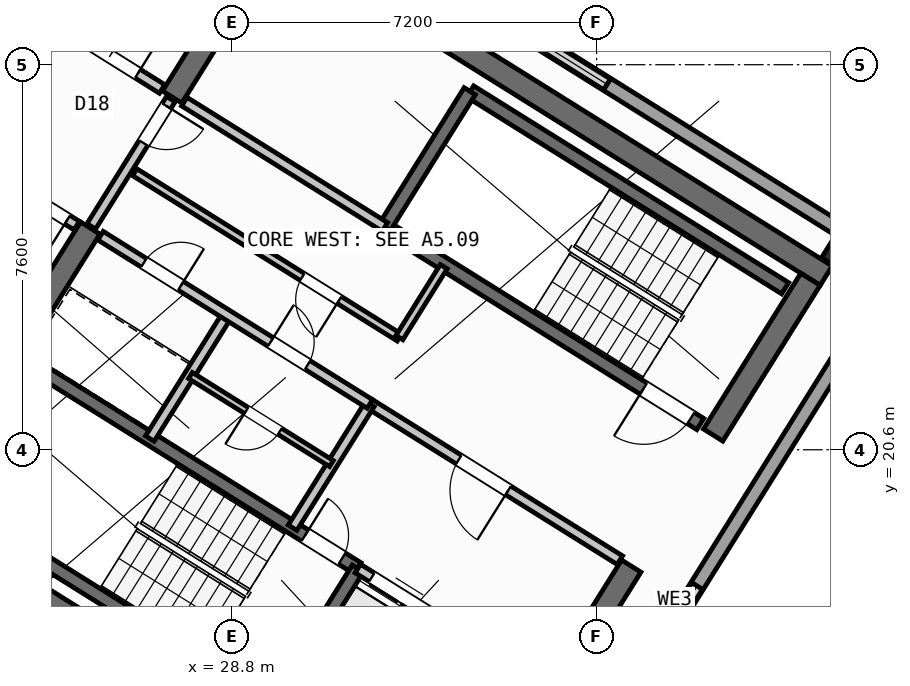
"""IFC4 building model, lengths in metres.
Left out: names, types, materials, properties, quantities, classifications, styles, units other than length and angle.
Written with IfcOpenShell. Run it as: python <this file> out.ifc"""

import sys

from ifc_helpers import new_model, si_unit, direction, frame, frame_2d, origin, origin_2d, place, context, subcontext, project, spatial, rectangle, hollow_rectangle, extrude, source, transform, mapped, element, fill, save


model = new_model("IFC4")
c1 = context("Model", 3, precision=1e-05, world=origin(), true_north=direction((0.0, 1.0)))
c2 = subcontext(c1, "Body", "Model", "MODEL_VIEW")
j1 = project(units=[si_unit("LENGTHUNIT", "METRE"), si_unit("PLANEANGLEUNIT", "RADIAN")], contexts=[c1])
p1 = place(None, origin())
s1 = spatial("IfcSite", under=j1, at=p1, CompositionType="ELEMENT")
p2 = place(p1, origin())
s2 = spatial("IfcBuilding", under=s1, at=p2, CompositionType="ELEMENT")
p3 = place(p2, frame((0.0, 0.0, 313.2)))
s3 = spatial("IfcBuildingStorey", under=s2, at=p3, CompositionType="ELEMENT", Elevation=313.2)
p4 = place(p3, frame((40.531, 24.036, 0.0), z_axis=(0.0, 0.0, 1.0), x_axis=(-0.848048787466, 0.529918157905, 0.0)))
e1 = element("IfcWall", 1, at=p4, inside=s3, PredefinedType="SHEAR", context=c2, shape_type="SweptSolid", body=[
    extrude(rectangle(XDim=13.04, YDim=0.45, at=frame_2d((6.52, 0.0))), origin(), (0.0, 0.0, 1.0), 3.32),
])
p5 = place(p3, frame((33.324, 12.503, 0.0), z_axis=(0.0, 0.0, 1.0), x_axis=(-0.848043529849, 0.529926571782, 0.0)))
e2 = element("IfcWall", 2, at=p5, inside=s3, PredefinedType="SHEAR", context=c2, shape_type="SweptSolid", body=[
    extrude(rectangle(XDim=13.04, YDim=0.45, at=frame_2d((6.52, 0.0))), origin(), (0.0, 0.0, 1.0), 3.32),
])
p6 = place(p3, frame((40.221, 23.965, 0.0), z_axis=(0.0, 0.0, 1.0), x_axis=(-0.529902075036, -0.848058836916, 0.0)))
e3 = element("IfcWall", 3, at=p6, inside=s3, PredefinedType="SHEAR", context=c2, shape_type="SweptSolid", body=[
    extrude(rectangle(XDim=3.625, YDim=0.45, at=frame_2d((1.812, 0.0))), origin(), (0.0, 0.0, 1.0), 3.32),
])
p7 = place(p3, frame((36.683, 18.304, 0.0), z_axis=(0.0, 0.0, 1.0), x_axis=(-0.529904039071, -0.848057609704, 0.0)))
e4 = element("IfcWall", 4, at=p7, inside=s3, PredefinedType="SHEAR", context=c2, shape_type="SweptSolid", body=[
    extrude(rectangle(XDim=6.475, YDim=0.45, at=frame_2d((3.238, 0.0))), origin(), (0.0, 0.0, 1.0), 3.32),
])
p8 = place(p3, frame((29.544, 30.636, 0.0), z_axis=(0.0, 0.0, 1.0), x_axis=(-0.529902075036, -0.848058836916, 0.0)))
e5 = element("IfcWall", 5, at=p8, inside=s3, PredefinedType="SHEAR", context=c2, shape_type="SweptSolid", body=[
    extrude(rectangle(XDim=3.625, YDim=0.45, at=frame_2d((1.812, 0.0))), origin(), (0.0, 0.0, 1.0), 3.32),
])
p9 = place(p3, frame((26.007, 24.976, 0.0), z_axis=(0.0, 0.0, 1.0), x_axis=(-0.529931155655, -0.848040665456, 0.0)))
e6 = element("IfcWall", 6, at=p9, inside=s3, PredefinedType="SHEAR", context=c2, shape_type="SweptSolid", body=[
    extrude(rectangle(XDim=6.475, YDim=0.45, at=frame_2d((3.238, 0.0))), origin(), (0.0, 0.0, 1.0), 3.32),
])
m1 = source(origin(), c2, "Body", "SweptSolid", [
    extrude(hollow_rectangle(XDim=0.5, YDim=0.5, WallThickness=0.025, at=origin_2d()), origin(), (0.0, 0.0, 1.0), 3.6),
])
p10 = place(p3, frame((40.783, 24.469, 0.0), z_axis=(0.0, 0.0, 1.0), x_axis=(-0.848048096156, 0.529919264233, 0.0)))
e7 = element("IfcColumn", 7, at=p10, inside=s3, PredefinedType="COLUMN", context=c2, shape_type="MappedRepresentation", body=[
    mapped(m1, transform((0.0, 0.0, 0.0), scale=1.0)),
])
p11 = place(p3, frame((30.952, 10.212, 0.0), z_axis=(0.0, 0.0, 1.0), x_axis=(-0.848049555042, 0.529916929521, 0.0)))
e8 = element("IfcWall", 8, at=p11, inside=s3, PredefinedType="PARAPET", context=c2, shape_type="SweptSolid", body=[
    extrude(rectangle(XDim=16.056, YDim=0.24, at=frame_2d((8.028, 0.0))), origin(), (0.0, 0.0, 1.0), 1.15),
])
p12 = place(p3, frame((25.595, 32.3, 0.0), z_axis=(0.0, 0.0, 1.0), x_axis=(-0.529919212586, -0.848048128429, 0.0)))
e9 = element("IfcWall", 9, at=p12, inside=s3, PredefinedType="PARAPET", context=c2, shape_type="SweptSolid", body=[
    extrude(rectangle(XDim=12.937, YDim=0.24, at=frame_2d((6.469, 0.0))), origin(), (0.0, 0.0, 1.0), 1.15),
])
p13 = place(p3, frame((19.416, 18.399, 0.0), z_axis=(0.0, 0.0, 1.0), x_axis=(0.84804953868, -0.529916955705, 0.0)))
e10 = element("IfcWall", 10, at=p13, inside=s3, PredefinedType="PARAPET", context=c2, shape_type="SweptSolid", body=[
    extrude(rectangle(XDim=14.187, YDim=0.24, at=frame_2d((7.094, 0.0))), origin(), (0.0, 0.0, 1.0), 1.15),
])
p14 = place(p3, frame((41.182, 23.031, 0.0), z_axis=(0.0, 0.0, 1.0), x_axis=(-0.5299110544, -0.848053226174, 0.0)))
e11 = element("IfcWall", 11, at=p14, inside=s3, PredefinedType="STANDARD", context=c2, shape_type="SweptSolid", body=[
    extrude(rectangle(XDim=13.734, YDim=0.28, at=frame_2d((6.867, 0.0))), origin(), (0.0, 0.0, 1.0), 3.32),
])
p15 = place(p14, frame((6.017, 0.0, 0.85)))
e12 = element("IfcOpeningElement", 12, at=p15, cuts=e11, PredefinedType="OPENING", context=c2, shape_type="SweptSolid", body=[
    extrude(rectangle(XDim=1.7, YDim=1.6, at=frame_2d((0.85, 0.8))), frame((0.0, 0.15, 0.0), z_axis=(0.0, -1.0, 0.0), x_axis=(1.0, 0.0, 0.0)), (0.0, 0.0, 1.0), 0.3),
])
p16 = place(p3, frame((31.95, 10.932, 0.0), z_axis=(0.0, 0.0, 1.0), x_axis=(-0.848042238523, 0.52992863829, 0.0)))
e13 = element("IfcWall", 13, at=p16, inside=s3, PredefinedType="STANDARD", context=c2, shape_type="SweptSolid", body=[
    extrude(rectangle(XDim=14.984, YDim=0.28, at=frame_2d((7.492, 0.0))), origin(), (0.0, 0.0, 1.0), 3.32),
])
p17 = place(p16, frame((6.283, 0.0, 0.85)))
e14 = element("IfcOpeningElement", 14, at=p17, cuts=e13, PredefinedType="OPENING", context=c2, shape_type="SweptSolid", body=[
    extrude(rectangle(XDim=1.7, YDim=1.6, at=frame_2d((0.85, 0.8))), frame((0.0, 0.15, 0.0), z_axis=(0.0, -1.0, 0.0), x_axis=(1.0, 0.0, 0.0)), (0.0, 0.0, 1.0), 0.3),
])
p18 = place(p3, frame((18.792, 20.827, 0.0), z_axis=(0.0, 0.0, 1.0), x_axis=(0.5299110544, 0.848053226174, 0.0)))
e15 = element("IfcWall", 15, at=p18, inside=s3, PredefinedType="STANDARD", context=c2, shape_type="SweptSolid", body=[
    extrude(rectangle(XDim=13.734, YDim=0.28, at=frame_2d((6.867, 0.0))), origin(), (0.0, 0.0, 1.0), 3.32),
])
p19 = place(p18, frame((2.721, 0.0, 0.85)))
e16 = element("IfcOpeningElement", 16, at=p19, cuts=e15, PredefinedType="OPENING", context=c2, shape_type="SweptSolid", body=[
    extrude(rectangle(XDim=1.7, YDim=1.6, at=frame_2d((0.85, 0.8))), frame((0.0, 0.15, 0.0), z_axis=(0.0, -1.0, 0.0), x_axis=(1.0, 0.0, 0.0)), (0.0, 0.0, 1.0), 0.3),
])
p20 = place(p18, frame((11.278, 0.0, 0.85)))
e17 = element("IfcOpeningElement", 17, at=p20, cuts=e15, PredefinedType="OPENING", context=c2, shape_type="SweptSolid", body=[
    extrude(rectangle(XDim=1.7, YDim=1.6, at=frame_2d((0.85, 0.8))), frame((0.0, 0.15, 0.0), z_axis=(0.0, -1.0, 0.0), x_axis=(1.0, 0.0, 0.0)), (0.0, 0.0, 1.0), 0.3),
])
p21 = place(p3, frame((28.023, 32.925, 0.0), z_axis=(0.0, 0.0, 1.0), x_axis=(0.848049560819, -0.529916920276, 0.0)))
e18 = element("IfcWall", 18, at=p21, inside=s3, PredefinedType="STANDARD", context=c2, shape_type="SweptSolid", body=[
    extrude(rectangle(XDim=14.984, YDim=0.28, at=frame_2d((7.492, 0.0))), origin(), (0.0, 0.0, 1.0), 3.32),
])
p22 = place(p21, frame((7.968, 0.0, 0.85)))
e19 = element("IfcOpeningElement", 19, at=p22, cuts=e18, PredefinedType="OPENING", context=c2, shape_type="SweptSolid", body=[
    extrude(rectangle(XDim=1.7, YDim=1.6, at=frame_2d((0.85, 0.8))), frame((0.0, 0.15, 0.0), z_axis=(0.0, -1.0, 0.0), x_axis=(1.0, 0.0, 0.0)), (0.0, 0.0, 1.0), 0.3),
])
p23 = place(p3, frame((29.605, 15.581, 0.0), z_axis=(0.0, 0.0, 1.0), x_axis=(-0.848036911448, 0.529937163087, 0.0)))
e20 = element("IfcWall", 20, at=p23, inside=s3, PredefinedType="SHEAR", context=c2, shape_type="SweptSolid", body=[
    extrude(rectangle(XDim=7.46, YDim=0.26, at=frame_2d((3.73, 0.0))), origin(), (0.0, 0.0, 1.0), 3.32),
])
p24 = place(p3, frame((31.28, 18.261, 0.0), z_axis=(0.0, 0.0, 1.0), x_axis=(-0.848051618787, 0.529913626805, 0.0)))
e21 = element("IfcWall", 21, at=p24, inside=s3, PredefinedType="SHEAR", context=c2, shape_type="SweptSolid", body=[
    extrude(rectangle(XDim=7.46, YDim=0.26, at=frame_2d((3.73, 0.0))), origin(), (0.0, 0.0, 1.0), 3.32),
])
p25 = place(p24, frame((0.36, 0.0, 0.0)))
e22 = element("IfcOpeningElement", 22, at=p25, cuts=e21, PredefinedType="OPENING", context=c2, shape_type="SweptSolid", body=[
    extrude(rectangle(XDim=0.86, YDim=2.05, at=frame_2d((0.43, 1.025))), frame((0.0, 0.14, 0.0), z_axis=(0.0, -1.0, 0.0), x_axis=(1.0, 0.0, 0.0)), (0.0, 0.0, 1.0), 0.28),
])
p26 = place(p3, frame((31.288, 18.256, 0.0), z_axis=(0.0, 0.0, 1.0), x_axis=(-0.529943379326, -0.848033026897, 0.0)))
e23 = element("IfcWall", 23, at=p26, inside=s3, PredefinedType="SHEAR", context=c2, shape_type="SweptSolid", body=[
    extrude(rectangle(XDim=3.16, YDim=0.26, at=frame_2d((1.58, 0.0))), origin(), (0.0, 0.0, 1.0), 3.32),
])
p27 = place(p3, frame((39.721, 23.788, 0.0), z_axis=(0.0, 0.0, 1.0), x_axis=(-0.848054434086, 0.529909121291, 0.0)))
e24 = element("IfcWall", 24, at=p27, inside=s3, PredefinedType="SHEAR", context=c2, shape_type="SweptSolid", body=[
    extrude(rectangle(XDim=7.33, YDim=0.26, at=frame_2d((3.665, 0.0))), origin(), (0.0, 0.0, 1.0), 3.32),
])
p28 = place(p3, frame((38.046, 21.108, 0.0), z_axis=(0.0, 0.0, 1.0), x_axis=(-0.848054434086, 0.529909121291, 0.0)))
e25 = element("IfcWall", 25, at=p28, inside=s3, PredefinedType="SHEAR", context=c2, shape_type="SweptSolid", body=[
    extrude(rectangle(XDim=7.33, YDim=0.26, at=frame_2d((3.665, 0.0))), origin(), (0.0, 0.0, 1.0), 3.32),
])
p29 = place(p28, frame((0.22, 0.0, 0.0)))
e26 = element("IfcOpeningElement", 26, at=p29, cuts=e25, PredefinedType="OPENING", context=c2, shape_type="SweptSolid", body=[
    extrude(rectangle(XDim=1.1, YDim=2.1, at=frame_2d((0.55, 1.05))), frame((0.0, 0.14, 0.0), z_axis=(0.0, -1.0, 0.0), x_axis=(1.0, 0.0, 0.0)), (0.0, 0.0, 1.0), 0.28),
])
p30 = place(p3, frame((33.496, 27.677, 0.0), z_axis=(0.0, 0.0, 1.0), x_axis=(-0.529908658664, -0.84805472316, 0.0)))
e27 = element("IfcWall", 27, at=p30, inside=s3, PredefinedType="SHEAR", context=c2, shape_type="SweptSolid", body=[
    extrude(rectangle(XDim=3.16, YDim=0.26, at=frame_2d((1.58, 0.0))), origin(), (0.0, 0.0, 1.0), 3.32),
])
p31 = place(p3, frame((34.933, 15.978, 0.0), z_axis=(0.0, 0.0, 1.0), x_axis=(-0.848055739377, 0.529907032327, 0.0)))
e28 = element("IfcWall", 28, at=p31, inside=s3, PredefinedType="STANDARD", context=c2, shape_type="SweptSolid", body=[
    extrude(rectangle(XDim=4.298, YDim=0.2, at=frame_2d((2.149, 0.0))), origin(), (0.0, 0.0, 1.0), 3.31),
])
p32 = place(p31, frame((0.448, 0.0, 0.0)))
e29 = element("IfcOpeningElement", 29, at=p32, cuts=e28, PredefinedType="OPENING", context=c2, shape_type="SweptSolid", body=[
    extrude(rectangle(XDim=1.3, YDim=2.2, at=frame_2d((0.65, 1.1))), frame((0.0, 0.11, 0.0), z_axis=(0.0, -1.0, 0.0), x_axis=(1.0, 0.0, 0.0)), (0.0, 0.0, 1.0), 0.22),
])
p33 = place(p31, frame((2.523, 0.0, 0.0)))
e30 = element("IfcOpeningElement", 30, at=p33, cuts=e28, PredefinedType="OPENING", context=c2, shape_type="SweptSolid", body=[
    extrude(rectangle(XDim=1.45, YDim=2.25, at=frame_2d((0.725, 1.125))), frame((0.0, 0.11, 0.0), z_axis=(0.0, -1.0, 0.0), x_axis=(1.0, 0.0, 0.0)), (0.0, 0.0, 1.0), 0.22),
])
p34 = place(p3, frame((36.459, 18.421, 0.0), z_axis=(0.0, 0.0, 1.0), x_axis=(-0.848059591691, 0.529900867089, 0.0)))
e31 = element("IfcWall", 31, at=p34, inside=s3, PredefinedType="STANDARD", context=c2, shape_type="SweptSolid", body=[
    extrude(rectangle(XDim=5.818, YDim=0.2, at=frame_2d((2.909, 0.0))), origin(), (0.0, 0.0, 1.0), 3.31),
])
p35 = place(p34, frame((2.598, 0.0, 0.0)))
e32 = element("IfcOpeningElement", 32, at=p35, cuts=e31, PredefinedType="OPENING", context=c2, shape_type="SweptSolid", body=[
    extrude(rectangle(XDim=1.15, YDim=2.1, at=frame_2d((0.575, 1.05))), frame((0.0, 0.11, 0.0), z_axis=(0.0, -1.0, 0.0), x_axis=(1.0, 0.0, 0.0)), (0.0, 0.0, 1.0), 0.22),
])
p36 = place(p3, frame((31.822, 24.998, 0.0), z_axis=(0.0, 0.0, 1.0), x_axis=(-0.848054125777, 0.529909614701, 0.0)))
e33 = element("IfcWall", 33, at=p36, inside=s3, PredefinedType="STANDARD", context=c2, shape_type="SweptSolid", body=[
    extrude(rectangle(XDim=4.668, YDim=0.2, at=frame_2d((2.334, 0.0))), origin(), (0.0, 0.0, 1.0), 3.31),
])
p37 = place(p3, frame((32.108, 22.814, 0.0), z_axis=(0.0, 0.0, 1.0), x_axis=(-0.848047283855, 0.529920564185, 0.0)))
e34 = element("IfcWall", 34, at=p37, inside=s3, PredefinedType="PARTITIONING", context=c2, shape_type="SweptSolid", body=[
    extrude(rectangle(XDim=6.16, YDim=0.16, at=frame_2d((3.08, 0.0))), origin(), (0.0, 0.0, 1.0), 3.31),
])
p38 = place(p37, frame((1.4, 0.0, 0.0)))
e35 = element("IfcOpeningElement", 35, at=p38, cuts=e34, PredefinedType="OPENING", context=c2, shape_type="SweptSolid", body=[
    extrude(rectangle(XDim=0.86, YDim=2.05, at=frame_2d((0.43, 1.025))), frame((0.0, 0.09, 0.0), z_axis=(0.0, -1.0, 0.0), x_axis=(1.0, 0.0, 0.0)), (0.0, 0.0, 1.0), 0.18),
])
p39 = place(p3, frame((32.982, 24.213, 0.0), z_axis=(0.0, 0.0, 1.0), x_axis=(-0.529839334948, -0.84809803628, 0.0)))
e36 = element("IfcWall", 36, at=p39, inside=s3, PredefinedType="PARTITIONING", context=c2, shape_type="SweptSolid", body=[
    extrude(rectangle(XDim=1.65, YDim=0.16, at=frame_2d((0.825, 0.0))), origin(), (0.0, 0.0, 1.0), 3.31),
])
for number, where, z_axis, x_axis in (
    (37, (31.525, 21.504, 0.0), (0.0, 0.0, 1.0), (-0.53, -0.848, 0.0)),
    (38, (28.71, 23.263, 0.0), (0.0, 0.0, 1.0), (-0.53, -0.848, 0.0)),
):
    element("IfcWall", number, at=place(p3, frame(where, z_axis=z_axis, x_axis=x_axis)), inside=s3, PredefinedType="STANDARD", context=c2, shape_type="SweptSolid", body=[
        extrude(rectangle(XDim=2.88, YDim=0.2, at=frame_2d((1.44, 0.0))), origin(), (0.0, 0.0, 1.0), 3.31),
    ])
p40 = place(p3, frame((31.525, 21.504, 0.0), z_axis=(0.0, 0.0, 1.0), x_axis=(-0.848042066329, 0.529928913853, 0.0)))
e39 = element("IfcWall", 39, at=p40, inside=s3, PredefinedType="STANDARD", context=c2, shape_type="SweptSolid", body=[
    extrude(rectangle(XDim=6.268, YDim=0.2, at=frame_2d((3.134, 0.0))), origin(), (0.0, 0.0, 1.0), 3.31),
])
p41 = place(p40, frame((4.4, 0.0, 0.0)))
e40 = element("IfcOpeningElement", 40, at=p41, cuts=e39, PredefinedType="OPENING", context=c2, shape_type="SweptSolid", body=[
    extrude(rectangle(XDim=0.86, YDim=2.05, at=frame_2d((0.43, 1.025))), frame((0.0, 0.11, 0.0), z_axis=(0.0, -1.0, 0.0), x_axis=(1.0, 0.0, 0.0)), (0.0, 0.0, 1.0), 0.22),
])
p42 = place(p40, frame((1.45, 0.0, 0.0)))
e41 = element("IfcOpeningElement", 41, at=p42, cuts=e39, PredefinedType="OPENING", context=c2, shape_type="SweptSolid", body=[
    extrude(rectangle(XDim=0.86, YDim=2.05, at=frame_2d((0.43, 1.025))), frame((0.0, 0.11, 0.0), z_axis=(0.0, -1.0, 0.0), x_axis=(1.0, 0.0, 0.0)), (0.0, 0.0, 1.0), 0.22),
])
p43 = place(p3, frame((30.766, 20.327, 0.0), z_axis=(0.0, 0.0, 1.0), x_axis=(-0.848052663127, 0.529911955482, 0.0)))
e42 = element("IfcWall", 42, at=p43, inside=s3, PredefinedType="PLUMBINGWALL", context=c2, shape_type="SweptSolid", body=[
    extrude(rectangle(XDim=3.28, YDim=0.14, at=frame_2d((1.64, 0.0))), origin(), (0.0, 0.0, 1.0), 3.31),
])
p44 = place(p43, frame((1.2, 0.0, 0.0)))
e43 = element("IfcOpeningElement", 43, at=p44, cuts=e42, PredefinedType="OPENING", context=c2, shape_type="SweptSolid", body=[
    extrude(rectangle(XDim=0.78, YDim=2.05, at=frame_2d((0.39, 1.025))), frame((0.0, 0.08, 0.0), z_axis=(0.0, -1.0, 0.0), x_axis=(1.0, 0.0, 0.0)), (0.0, 0.0, 1.0), 0.16),
])
p45 = place(p3, frame((27.596, 27.52, 0.0), z_axis=(0.0, 0.0, 1.0), x_axis=(-0.529865479138, -0.848081702443, 0.0)))
e44 = element("IfcWall", 44, at=p45, inside=s3, PredefinedType="STANDARD", context=c2, shape_type="SweptSolid", body=[
    extrude(rectangle(XDim=2.96, YDim=0.2, at=frame_2d((1.48, 0.0))), origin(), (0.0, 0.0, 1.0), 3.31),
])
p46 = place(p45, frame((0.16, 0.0, 0.0)))
e45 = element("IfcOpeningElement", 45, at=p46, cuts=e44, PredefinedType="OPENING", context=c2, shape_type="SweptSolid", body=[
    extrude(rectangle(XDim=0.86, YDim=2.05, at=frame_2d((0.43, 1.025))), frame((0.0, 0.11, 0.0), z_axis=(0.0, -1.0, 0.0), x_axis=(1.0, 0.0, 0.0)), (0.0, 0.0, 1.0), 0.22),
])
p47 = place(p3, frame((25.74, 25.025, 0.0), z_axis=(0.0, 0.0, 1.0), x_axis=(-0.848057965138, 0.529903470233, 0.0)))
e46 = element("IfcWall", 46, at=p47, inside=s3, PredefinedType="STANDARD", context=c2, shape_type="SweptSolid", body=[
    extrude(rectangle(XDim=3.678, YDim=0.2, at=frame_2d((1.839, 0.0))), origin(), (0.0, 0.0, 1.0), 3.31),
])
p48 = place(p47, frame((0.218, 0.0, 0.0)))
e47 = element("IfcOpeningElement", 47, at=p48, cuts=e46, PredefinedType="OPENING", context=c2, shape_type="SweptSolid", body=[
    extrude(rectangle(XDim=0.86, YDim=2.05, at=frame_2d((0.43, 1.025))), frame((0.0, 0.11, 0.0), z_axis=(0.0, -1.0, 0.0), x_axis=(1.0, 0.0, 0.0)), (0.0, 0.0, 1.0), 0.22),
])
p49 = place(p47, frame((2.003, 0.0, 0.0)))
e48 = element("IfcOpeningElement", 48, at=p49, cuts=e46, PredefinedType="OPENING", context=c2, shape_type="SweptSolid", body=[
    extrude(rectangle(XDim=0.86, YDim=2.05, at=frame_2d((0.43, 1.025))), frame((0.0, 0.11, 0.0), z_axis=(0.0, -1.0, 0.0), x_axis=(1.0, 0.0, 0.0)), (0.0, 0.0, 1.0), 0.22),
])
p50 = place(p3, frame((27.425, 27.721, 0.0), z_axis=(0.0, 0.0, 1.0), x_axis=(-0.848057965138, 0.529903470233, 0.0)))
e49 = element("IfcWall", 49, at=p50, inside=s3, PredefinedType="STANDARD", context=c2, shape_type="SweptSolid", body=[
    extrude(rectangle(XDim=3.678, YDim=0.2, at=frame_2d((1.839, 0.0))), origin(), (0.0, 0.0, 1.0), 3.31),
])
p51 = place(p50, frame((0.568, 0.0, 0.0)))
e50 = element("IfcOpeningElement", 50, at=p51, cuts=e49, PredefinedType="OPENING", context=c2, shape_type="SweptSolid", body=[
    extrude(rectangle(XDim=1.3, YDim=2.15, at=frame_2d((0.65, 1.075))), frame((0.0, 0.11, 0.0), z_axis=(0.0, -1.0, 0.0), x_axis=(1.0, 0.0, 0.0)), (0.0, 0.0, 1.0), 0.22),
])
m2 = source(origin(), c2, "Body", "SweptSolid", [
    extrude(rectangle(XDim=1.7, YDim=1.6, at=frame_2d((0.85, 0.8))), frame((0.0, 0.03, 0.0), z_axis=(0.0, -1.0, 0.0), x_axis=(1.0, 0.0, 0.0)), (0.0, 0.0, 1.0), 0.06),
])
p52 = place(p15, origin())
e51 = element("IfcWindow", 51, at=p52, inside=s3, PartitioningType="SINGLE_PANEL", PredefinedType="WINDOW", context=c2, shape_type="MappedRepresentation", body=[
    mapped(m2, transform((0.0, 0.0, 0.0), scale=1.0)),
])
fill(e12, e51)
p53 = place(p22, origin())
e52 = element("IfcWindow", 52, at=p53, inside=s3, PartitioningType="SINGLE_PANEL", PredefinedType="WINDOW", context=c2, shape_type="MappedRepresentation", body=[
    mapped(m2, transform((0.0, 0.0, 0.0), scale=1.0)),
])
fill(e19, e52)
m3 = source(origin(), c2, "Body", "SweptSolid", [
    extrude(rectangle(XDim=0.86, YDim=2.05, at=frame_2d((0.43, 1.025))), frame((0.0, 0.025, 0.0), z_axis=(0.0, -1.0, 0.0), x_axis=(1.0, 0.0, 0.0)), (0.0, 0.0, 1.0), 0.05),
])
p54 = place(p25, frame((0.86, 0.0, 0.0), z_axis=(0.0, 0.0, 1.0), x_axis=(-1.0, 0.0, 0.0)))
e53 = element("IfcDoor", 53, at=p54, inside=s3, OperationType="SINGLE_SWING_LEFT", PredefinedType="DOOR", context=c2, shape_type="MappedRepresentation", body=[
    mapped(m3, transform((0.0, 0.0, 0.0), scale=1.0)),
])
fill(e22, e53)
p55 = place(p38, origin())
e54 = element("IfcDoor", 54, at=p55, inside=s3, OperationType="SINGLE_SWING_LEFT", PredefinedType="DOOR", context=c2, shape_type="MappedRepresentation", body=[
    mapped(m3, transform((0.0, 0.0, 0.0), scale=1.0)),
])
fill(e35, e54)
m4 = source(origin(), c2, "Body", "SweptSolid", [
    extrude(rectangle(XDim=1.1, YDim=2.1, at=frame_2d((0.55, 1.05))), frame((0.0, 0.025, 0.0), z_axis=(0.0, -1.0, 0.0), x_axis=(1.0, 0.0, 0.0)), (0.0, 0.0, 1.0), 0.05),
])
p56 = place(p29, origin())
e55 = element("IfcDoor", 55, at=p56, inside=s3, OperationType="SINGLE_SWING_RIGHT", PredefinedType="DOOR", context=c2, shape_type="MappedRepresentation", body=[
    mapped(m4, transform((0.0, 0.0, 0.0), scale=1.0)),
])
fill(e26, e55)
m5 = source(origin(), c2, "Body", "SweptSolid", [
    extrude(rectangle(XDim=1.15, YDim=2.1, at=frame_2d((0.575, 1.05))), frame((0.0, 0.025, 0.0), z_axis=(0.0, -1.0, 0.0), x_axis=(1.0, 0.0, 0.0)), (0.0, 0.0, 1.0), 0.05),
])
p57 = place(p35, origin())
e56 = element("IfcDoor", 56, at=p57, inside=s3, OperationType="SINGLE_SWING_LEFT", PredefinedType="DOOR", context=c2, shape_type="MappedRepresentation", body=[
    mapped(m5, transform((0.0, 0.0, 0.0), scale=1.0)),
])
fill(e32, e56)
m6 = source(origin(), c2, "Body", "SweptSolid", [
    extrude(rectangle(XDim=1.45, YDim=2.25, at=frame_2d((0.725, 1.125))), frame((0.0, 0.025, 0.0), z_axis=(0.0, -1.0, 0.0), x_axis=(1.0, 0.0, 0.0)), (0.0, 0.0, 1.0), 0.05),
])
p58 = place(p33, origin())
e57 = element("IfcDoor", 57, at=p58, inside=s3, OperationType="DOUBLE_DOOR_SLIDING", PredefinedType="DOOR", context=c2, shape_type="MappedRepresentation", body=[
    mapped(m6, transform((0.0, 0.0, 0.0), scale=1.0)),
])
fill(e30, e57)
p59 = place(p41, frame((0.86, 0.0, 0.0), z_axis=(0.0, 0.0, 1.0), x_axis=(-1.0, 0.0, 0.0)))
e58 = element("IfcDoor", 58, at=p59, inside=s3, OperationType="SINGLE_SWING_RIGHT", PredefinedType="DOOR", context=c2, shape_type="MappedRepresentation", body=[
    mapped(m3, transform((0.0, 0.0, 0.0), scale=1.0)),
])
fill(e40, e58)
p60 = place(p42, frame((0.86, 0.0, 0.0), z_axis=(0.0, 0.0, 1.0), x_axis=(-1.0, 0.0, 0.0)))
e59 = element("IfcDoor", 59, at=p60, inside=s3, OperationType="SINGLE_SWING_LEFT", PredefinedType="DOOR", context=c2, shape_type="MappedRepresentation", body=[
    mapped(m3, transform((0.0, 0.0, 0.0), scale=1.0)),
])
fill(e41, e59)
m7 = source(origin(), c2, "Body", "SweptSolid", [
    extrude(rectangle(XDim=0.78, YDim=2.05, at=frame_2d((0.39, 1.025))), frame((0.0, 0.025, 0.0), z_axis=(0.0, -1.0, 0.0), x_axis=(1.0, 0.0, 0.0)), (0.0, 0.0, 1.0), 0.05),
])
p61 = place(p44, origin())
e60 = element("IfcDoor", 60, at=p61, inside=s3, OperationType="SINGLE_SWING_RIGHT", PredefinedType="DOOR", context=c2, shape_type="MappedRepresentation", body=[
    mapped(m7, transform((0.0, 0.0, 0.0), scale=1.0)),
])
fill(e43, e60)
p62 = place(p46, origin())
e61 = element("IfcDoor", 61, at=p62, inside=s3, OperationType="SINGLE_SWING_LEFT", PredefinedType="DOOR", context=c2, shape_type="MappedRepresentation", body=[
    mapped(m3, transform((0.0, 0.0, 0.0), scale=1.0)),
])
fill(e45, e61)
p63 = place(p48, origin())
e62 = element("IfcDoor", 62, at=p63, inside=s3, OperationType="SINGLE_SWING_LEFT", PredefinedType="DOOR", context=c2, shape_type="MappedRepresentation", body=[
    mapped(m3, transform((0.0, 0.0, 0.0), scale=1.0)),
])
fill(e47, e62)
m8 = source(origin(), c2, "Body", "SweptSolid", [
    extrude(rectangle(XDim=1.3, YDim=2.15, at=frame_2d((0.65, 1.075))), frame((0.0, 0.025, 0.0), z_axis=(0.0, -1.0, 0.0), x_axis=(1.0, 0.0, 0.0)), (0.0, 0.0, 1.0), 0.05),
])
p64 = place(p51, frame((1.3, 0.0, 0.0), z_axis=(0.0, 0.0, 1.0), x_axis=(-1.0, 0.0, 0.0)))
e63 = element("IfcDoor", 63, at=p64, inside=s3, OperationType="DOUBLE_DOOR_SINGLE_SWING", PredefinedType="DOOR", context=c2, shape_type="MappedRepresentation", body=[
    mapped(m8, transform((0.0, 0.0, 0.0), scale=1.0)),
])
fill(e50, e63)
save(model, sys.argv[1])
